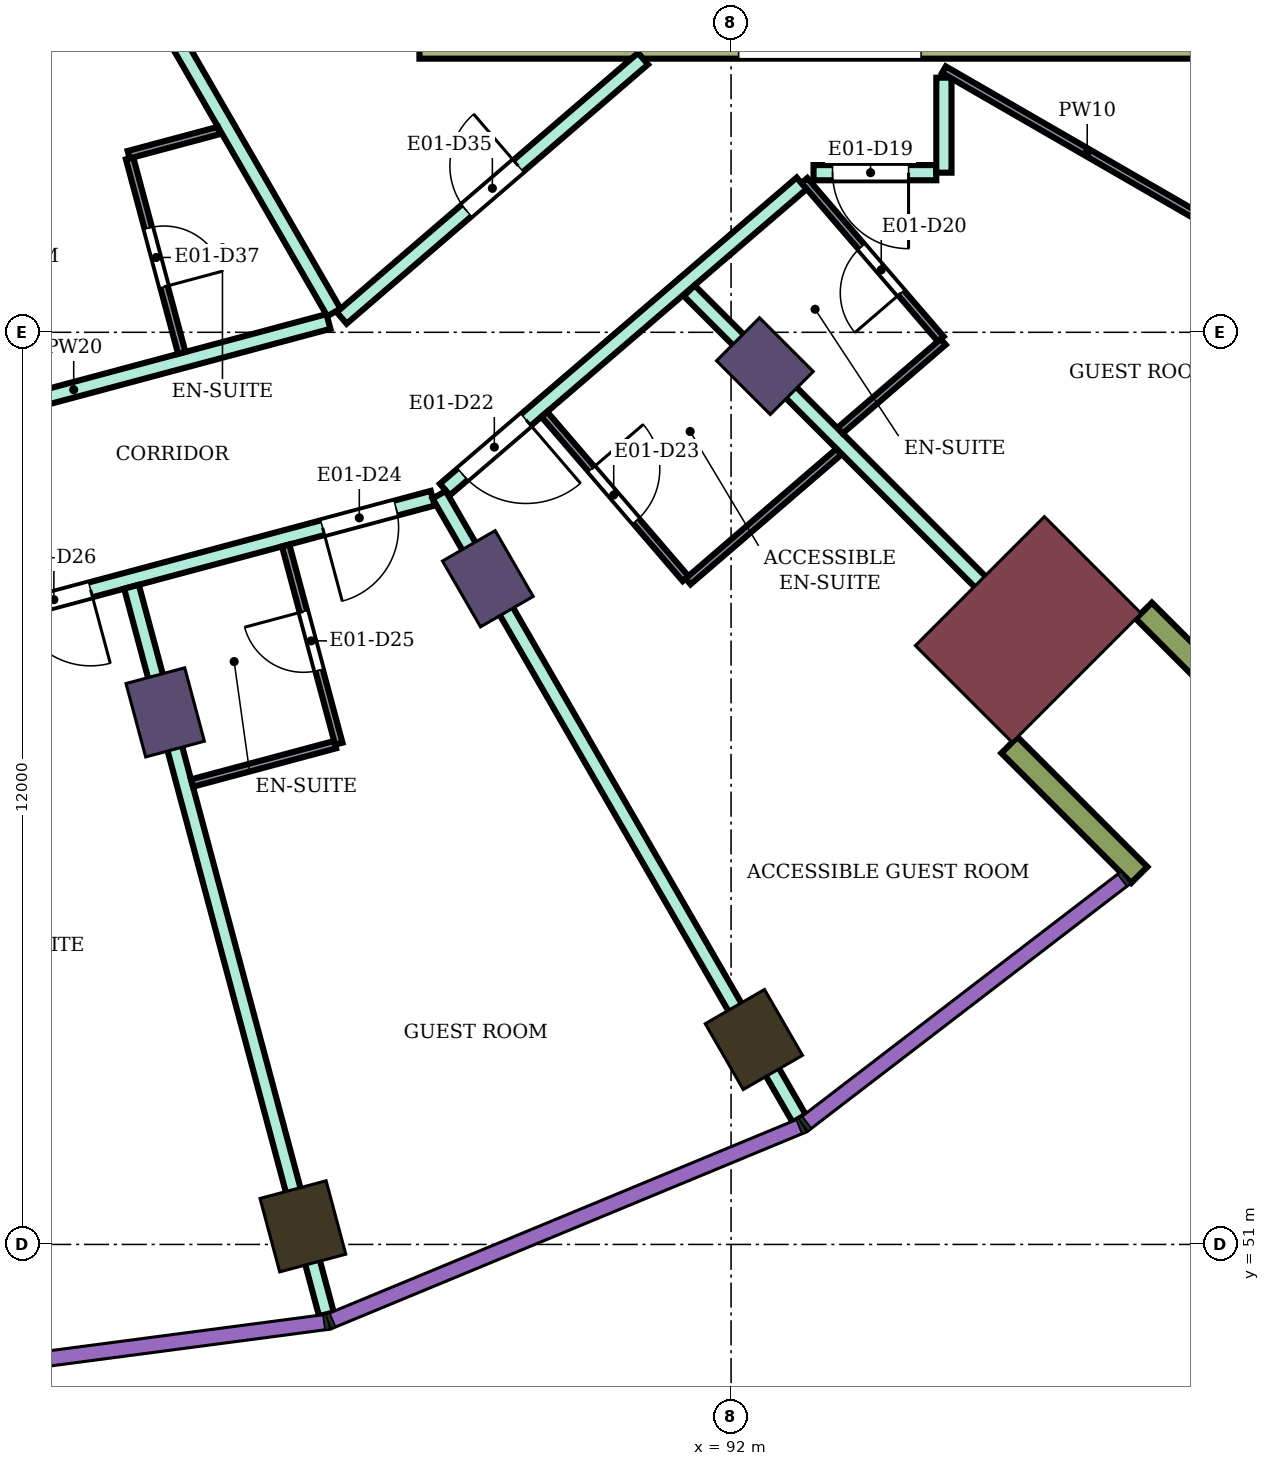
"""IFC4 building model, lengths in metres.
Left out: names, types, materials, properties, quantities, classifications, styles, units other than length and angle.
Written with IfcOpenShell. Run it as: python <this file> out.ifc"""

import sys

from ifc_helpers import new_model, si_unit, direction, frame, frame_2d, origin, origin_2d, place, context, subcontext, project, spatial, rectangle, extrude, element, fill, save


model = new_model("IFC4")
c1 = context("Model", 3, precision=1e-05, world=origin(), true_north=direction((0.0, 1.0)))
c2 = subcontext(c1, "Body", "Model", "MODEL_VIEW")
j1 = project(units=[si_unit("LENGTHUNIT", "METRE"), si_unit("PLANEANGLEUNIT", "RADIAN")], contexts=[c1])
p1 = place(None, origin())
s1 = spatial("IfcSite", under=j1, at=p1, CompositionType="ELEMENT")
p2 = place(p1, origin())
s2 = spatial("IfcBuilding", under=s1, at=p2, CompositionType="ELEMENT")
p3 = place(p2, frame((0.0, 0.0, 118.5)))
s3 = spatial("IfcBuildingStorey", under=s2, at=p3, CompositionType="ELEMENT", Elevation=118.5)
for number, where, z_axis, x_axis in (
    (1, (86.367, 51.238, 0.0), (0.0, 0.0, 1.0), (0.259, -0.966, 0.0)),
    (2, (92.3, 53.696, 0.0), (0.0, 0.0, 1.0), (0.5, -0.866, 0.0)),
):
    element("IfcColumn", number, at=place(p3, frame(where, z_axis=z_axis, x_axis=x_axis)), inside=s3, PredefinedType="COLUMN", context=c2, shape_type="SweptSolid", body=[
        extrude(rectangle(XDim=1.0, YDim=0.9, at=origin_2d()), origin(), (0.0, 0.0, 1.0), 3.9),
    ])
for number, where, z_axis, x_axis in (
    (3, (84.555, 58.0, 0.0), (0.0, 0.0, 1.0), (0.259, -0.966, 0.0)),
    (4, (88.8, 59.758, 0.0), (0.0, 0.0, 1.0), (0.5, -0.866, 0.0)),
    (5, (92.445, 62.555, 0.0), (0.0, 0.0, 1.0), (0.707, -0.707, 0.0)),
):
    element("IfcColumn", number, at=place(p3, frame(where, z_axis=z_axis, x_axis=x_axis)), inside=s3, PredefinedType="COLUMN", context=c2, shape_type="SweptSolid", body=[
        extrude(rectangle(XDim=1.0, YDim=0.8, at=origin_2d()), origin(), (0.0, 0.0, 1.0), 3.9),
    ])
p4 = place(p3, frame((95.91, 59.09, 0.0), z_axis=(0.0, 0.0, 1.0), x_axis=(0.707106781187, -0.707106781187, 0.0)))
e6 = element("IfcColumn", 6, at=p4, inside=s3, PredefinedType="COLUMN", context=c2, shape_type="SweptSolid", body=[
    extrude(rectangle(XDim=1.8, YDim=2.4, at=origin_2d()), origin(), (0.0, 0.0, 1.0), 3.9),
])
p5 = place(p3, frame((87.9, 66.95, 0.0), z_axis=(0.0, 0.0, 1.0), x_axis=(1.0, 0.0, 0.0)))
e7 = element("IfcWall", 7, at=p5, inside=s3, PredefinedType="SHEAR", context=c2, shape_type="SweptSolid", body=[
    extrude(rectangle(XDim=14.8, YDim=0.7, at=frame_2d((7.4, 0.0))), origin(), (0.0, 0.0, 1.0), 3.58),
])
p6 = place(p5, frame((4.2, 0.0, 0.0)))
e8 = element("IfcOpeningElement", 8, at=p6, cuts=e7, PredefinedType="OPENING", context=c2, shape_type="SweptSolid", body=[
    extrude(rectangle(XDim=2.4, YDim=2.4, at=frame_2d((1.2, 1.2))), frame((0.0, 0.36, 0.0), z_axis=(0.0, -1.0, 0.0), x_axis=(1.0, 0.0, 0.0)), (0.0, 0.0, 1.0), 0.72),
])
for number, where, z_axis, x_axis in (
    (9, (95.662, 57.57, 0.0), (0.0, 0.0, 1.0), (0.707, -0.707, 0.0)),
    (10, (97.43, 59.338, 0.0), (0.0, 0.0, 1.0), (0.707, -0.707, 0.0)),
):
    element("IfcWall", number, at=place(p3, frame(where, z_axis=z_axis, x_axis=x_axis)), inside=s3, PredefinedType="NOTDEFINED", context=c2, shape_type="SweptSolid", body=[
        extrude(rectangle(XDim=2.416, YDim=0.3, at=frame_2d((1.208, 0.0))), origin(), (0.0, 0.0, 1.0), 3.9),
    ])
p7 = place(p3, frame((80.0, 58.655, 0.0), z_axis=(0.0, 0.0, 1.0), x_axis=(0.965967338894, 0.258664068224, 0.0)))
e11 = element("IfcWall", 11, at=p7, inside=s3, PredefinedType="PARTITIONING", context=c2, shape_type="SweptSolid", body=[
    extrude(rectangle(XDim=8.36, YDim=0.2, at=frame_2d((4.18, 0.0))), origin(), (0.0, 0.0, 1.0), 3.45),
])
p8 = place(p7, frame((6.86, 0.0, 0.0)))
e12 = element("IfcOpeningElement", 12, at=p8, cuts=e11, PredefinedType="OPENING", context=c2, shape_type="SweptSolid", body=[
    extrude(rectangle(XDim=1.0, YDim=2.1, at=frame_2d((0.5, 1.05))), frame((0.0, 0.11, 0.0), z_axis=(0.0, -1.0, 0.0), x_axis=(1.0, 0.0, 0.0)), (0.0, 0.0, 1.0), 0.22),
])
p9 = place(p7, frame((2.7, 0.0, 0.0)))
e13 = element("IfcOpeningElement", 13, at=p9, cuts=e11, PredefinedType="OPENING", context=c2, shape_type="SweptSolid", body=[
    extrude(rectangle(XDim=1.0, YDim=2.1, at=frame_2d((0.5, 1.05))), frame((0.0, 0.11, 0.0), z_axis=(0.0, -1.0, 0.0), x_axis=(1.0, 0.0, 0.0)), (0.0, 0.0, 1.0), 0.22),
])
p10 = place(p3, frame((80.0, 61.346, 0.0), z_axis=(0.0, 0.0, 1.0), x_axis=(0.965924181808, 0.258825182312, 0.0)))
e14 = element("IfcWall", 14, at=p10, inside=s3, PredefinedType="PARTITIONING", context=c2, shape_type="SweptSolid", body=[
    extrude(rectangle(XDim=6.94, YDim=0.2, at=frame_2d((3.47, 0.0))), origin(), (0.0, 0.0, 1.0), 3.45),
])
p11 = place(p10, frame((0.55, 0.0, 0.0)))
e15 = element("IfcOpeningElement", 15, at=p11, cuts=e14, PredefinedType="OPENING", context=c2, shape_type="SweptSolid", body=[
    extrude(rectangle(XDim=1.0, YDim=2.1, at=frame_2d((0.5, 1.05))), frame((0.0, 0.11, 0.0), z_axis=(0.0, -1.0, 0.0), x_axis=(1.0, 0.0, 0.0)), (0.0, 0.0, 1.0), 0.22),
])
p12 = place(p3, frame((83.848, 68.332, 0.0), z_axis=(0.0, 0.0, 1.0), x_axis=(0.499933000352, -0.866064082594, 0.0)))
e16 = element("IfcWall", 16, at=p12, inside=s3, PredefinedType="PARTITIONING", context=c2, shape_type="SweptSolid", body=[
    extrude(rectangle(XDim=5.855, YDim=0.2, at=frame_2d((2.928, 0.0))), origin(), (0.0, 0.0, 1.0), 3.45),
])
p13 = place(p3, frame((84.112, 59.652, 0.0), z_axis=(0.0, 0.0, 1.0), x_axis=(0.258838718107, -0.965920554709, 0.0)))
e17 = element("IfcWall", 17, at=p13, inside=s3, PredefinedType="PARTITIONING", context=c2, shape_type="SweptSolid", body=[
    extrude(rectangle(XDim=9.908, YDim=0.2, at=frame_2d((4.954, 0.0))), origin(), (0.0, 0.0, 1.0), 3.45),
])
p14 = place(p3, frame((86.877, 63.189, 0.0), z_axis=(0.0, 0.0, 1.0), x_axis=(0.758075808328, 0.652166442581, 0.0)))
e18 = element("IfcWall", 18, at=p14, inside=s3, PredefinedType="PARTITIONING", context=c2, shape_type="SweptSolid", body=[
    extrude(rectangle(XDim=5.23, YDim=0.2, at=frame_2d((2.615, 0.0))), origin(), (0.0, 0.0, 1.0), 3.45),
])
p15 = place(p14, frame((2.165, 0.0, 0.0)))
e19 = element("IfcOpeningElement", 19, at=p15, cuts=e18, PredefinedType="OPENING", context=c2, shape_type="SweptSolid", body=[
    extrude(rectangle(XDim=0.9, YDim=2.1, at=frame_2d((0.45, 1.05))), frame((0.0, 0.11, 0.0), z_axis=(0.0, -1.0, 0.0), x_axis=(1.0, 0.0, 0.0)), (0.0, 0.0, 1.0), 0.22),
])
p16 = place(p3, frame((88.235, 60.931, 0.0), z_axis=(0.0, 0.0, 1.0), x_axis=(0.758816241808, 0.651304775945, 0.0)))
e20 = element("IfcWall", 20, at=p16, inside=s3, PredefinedType="PARTITIONING", context=c2, shape_type="SweptSolid", body=[
    extrude(rectangle(XDim=6.186, YDim=0.2, at=frame_2d((3.093, 0.0))), origin(), (0.0, 0.0, 1.0), 3.45),
])
p17 = place(p16, frame((0.308, 0.0, 0.0)))
e21 = element("IfcOpeningElement", 21, at=p17, cuts=e20, PredefinedType="OPENING", context=c2, shape_type="SweptSolid", body=[
    extrude(rectangle(XDim=1.1, YDim=2.1, at=frame_2d((0.55, 1.05))), frame((0.0, 0.11, 0.0), z_axis=(0.0, -1.0, 0.0), x_axis=(1.0, 0.0, 0.0)), (0.0, 0.0, 1.0), 0.22),
])
p18 = place(p3, frame((88.159, 60.863, 0.0), z_axis=(0.0, 0.0, 1.0), x_axis=(0.499935840196, -0.866062443296, 0.0)))
e22 = element("IfcWall", 22, at=p18, inside=s3, PredefinedType="PARTITIONING", context=c2, shape_type="SweptSolid", body=[
    extrude(rectangle(XDim=9.475, YDim=0.2, at=frame_2d((4.737, 0.0))), origin(), (0.0, 0.0, 1.0), 3.45),
])
p19 = place(p3, frame((91.449, 63.548, 0.0), z_axis=(0.0, 0.0, 1.0), x_axis=(0.706984804638, -0.707228736698, 0.0)))
e23 = element("IfcWall", 23, at=p19, inside=s3, PredefinedType="PARTITIONING", context=c2, shape_type="SweptSolid", body=[
    extrude(rectangle(XDim=7.006, YDim=0.2, at=frame_2d((3.503, 0.0))), origin(), (0.0, 0.0, 1.0), 3.45),
])
p20 = place(p3, frame((93.085, 65.1, 0.0), z_axis=(0.0, 0.0, 1.0), x_axis=(1.0, 0.0, 0.0)))
e24 = element("IfcWall", 24, at=p20, inside=s3, PredefinedType="PARTITIONING", context=c2, shape_type="SweptSolid", body=[
    extrude(rectangle(XDim=1.615, YDim=0.2, at=frame_2d((0.808, 0.0))), origin(), (0.0, 0.0, 1.0), 3.45),
])
p21 = place(p20, frame((0.25, 0.0, 0.0)))
e25 = element("IfcOpeningElement", 25, at=p21, cuts=e24, PredefinedType="OPENING", context=c2, shape_type="SweptSolid", body=[
    extrude(rectangle(XDim=1.0, YDim=2.1, at=frame_2d((0.5, 1.05))), frame((0.0, 0.11, 0.0), z_axis=(0.0, -1.0, 0.0), x_axis=(1.0, 0.0, 0.0)), (0.0, 0.0, 1.0), 0.22),
])
p22 = place(p3, frame((94.8, 65.1, 0.0), z_axis=(0.0, 0.0, 1.0), x_axis=(0.0, 1.0, 0.0)))
e26 = element("IfcWall", 26, at=p22, inside=s3, PredefinedType="PARTITIONING", context=c2, shape_type="SweptSolid", body=[
    extrude(rectangle(XDim=1.25, YDim=0.2, at=frame_2d((0.625, 0.0))), origin(), (0.0, 0.0, 1.0), 3.45),
])
p23 = place(p3, frame((84.087, 65.289, 0.0), z_axis=(0.0, 0.0, 1.0), x_axis=(0.258929459649, -0.965896234037, 0.0)))
e27 = element("IfcWall", 27, at=p23, inside=s3, PredefinedType="PARTITIONING", context=c2, shape_type="SweptSolid", body=[
    extrude(rectangle(XDim=2.65, YDim=0.1, at=frame_2d((1.325, 0.0))), origin(), (0.0, 0.0, 1.0), 3.45),
])
p24 = place(p23, frame((0.95, 0.0, 0.0)))
e28 = element("IfcOpeningElement", 28, at=p24, cuts=e27, PredefinedType="OPENING", context=c2, shape_type="SweptSolid", body=[
    extrude(rectangle(XDim=0.8, YDim=2.1, at=frame_2d((0.4, 1.05))), frame((0.0, 0.06, 0.0), z_axis=(0.0, -1.0, 0.0), x_axis=(1.0, 0.0, 0.0)), (0.0, 0.0, 1.0), 0.12),
])
p25 = place(p3, frame((84.074, 65.337, 0.0), z_axis=(0.0, 0.0, 1.0), x_axis=(0.965914351064, 0.258861867428, 0.0)))
e29 = element("IfcWall", 29, at=p25, inside=s3, PredefinedType="PARTITIONING", context=c2, shape_type="SweptSolid", body=[
    extrude(rectangle(XDim=1.229, YDim=0.1, at=frame_2d((0.615, 0.0))), origin(), (0.0, 0.0, 1.0), 3.45),
])
p26 = place(p3, frame((84.908, 57.07, 0.0), z_axis=(0.0, 0.0, 1.0), x_axis=(0.965853538138, 0.25908867761, 0.0)))
e30 = element("IfcWall", 30, at=p26, inside=s3, PredefinedType="PARTITIONING", context=c2, shape_type="SweptSolid", body=[
    extrude(rectangle(XDim=1.95, YDim=0.1, at=frame_2d((0.975, 0.0))), origin(), (0.0, 0.0, 1.0), 3.45),
])
p27 = place(p3, frame((86.14, 60.196, 0.0), z_axis=(0.0, 0.0, 1.0), x_axis=(0.258945475746, -0.965891940432, 0.0)))
e31 = element("IfcWall", 31, at=p27, inside=s3, PredefinedType="PARTITIONING", context=c2, shape_type="SweptSolid", body=[
    extrude(rectangle(XDim=2.7, YDim=0.1, at=frame_2d((1.35, 0.0))), origin(), (0.0, 0.0, 1.0), 3.45),
])
p28 = place(p27, frame((0.9, 0.0, 0.0)))
e32 = element("IfcOpeningElement", 32, at=p28, cuts=e31, PredefinedType="OPENING", context=c2, shape_type="SweptSolid", body=[
    extrude(rectangle(XDim=0.8, YDim=2.1, at=frame_2d((0.4, 1.05))), frame((0.0, 0.06, 0.0), z_axis=(0.0, -1.0, 0.0), x_axis=(1.0, 0.0, 0.0)), (0.0, 0.0, 1.0), 0.12),
])
p29 = place(p3, frame((89.543, 61.921, 0.0), z_axis=(0.0, 0.0, 1.0), x_axis=(0.651996917864, -0.758221616083, 0.0)))
e33 = element("IfcWall", 33, at=p29, inside=s3, PredefinedType="PARTITIONING", context=c2, shape_type="SweptSolid", body=[
    extrude(rectangle(XDim=2.85, YDim=0.1, at=frame_2d((1.425, 0.0))), origin(), (0.0, 0.0, 1.0), 3.45),
])
p30 = place(p29, frame((0.95, 0.0, 0.0)))
e34 = element("IfcOpeningElement", 34, at=p30, cuts=e33, PredefinedType="OPENING", context=c2, shape_type="SweptSolid", body=[
    extrude(rectangle(XDim=0.9, YDim=2.1, at=frame_2d((0.45, 1.05))), frame((0.0, 0.06, 0.0), z_axis=(0.0, -1.0, 0.0), x_axis=(1.0, 0.0, 0.0)), (0.0, 0.0, 1.0), 0.12),
])
p31 = place(p3, frame((91.434, 59.722, 0.0), z_axis=(0.0, 0.0, 1.0), x_axis=(0.758076316785, 0.652165851552, 0.0)))
e35 = element("IfcWall", 35, at=p31, inside=s3, PredefinedType="PARTITIONING", context=c2, shape_type="SweptSolid", body=[
    extrude(rectangle(XDim=2.616, YDim=0.1, at=frame_2d((1.308, 0.0))), origin(), (0.0, 0.0, 1.0), 3.45),
])
p32 = place(p3, frame((92.965, 64.997, 0.0), z_axis=(0.0, 0.0, 1.0), x_axis=(0.652069888227, -0.758158862553, 0.0)))
e36 = element("IfcWall", 36, at=p32, inside=s3, PredefinedType="PARTITIONING", context=c2, shape_type="SweptSolid", body=[
    extrude(rectangle(XDim=2.75, YDim=0.1, at=frame_2d((1.375, 0.0))), origin(), (0.0, 0.0, 1.0), 3.45),
])
p33 = place(p32, frame((1.15, 0.0, 0.0)))
e37 = element("IfcOpeningElement", 37, at=p33, cuts=e36, PredefinedType="OPENING", context=c2, shape_type="SweptSolid", body=[
    extrude(rectangle(XDim=0.8, YDim=2.1, at=frame_2d((0.4, 1.05))), frame((0.0, 0.06, 0.0), z_axis=(0.0, -1.0, 0.0), x_axis=(1.0, 0.0, 0.0)), (0.0, 0.0, 1.0), 0.12),
])
p34 = place(p3, frame((93.435, 61.707, 0.0), z_axis=(0.0, 0.0, 1.0), x_axis=(0.758070495124, 0.652172618578, 0.0)))
e38 = element("IfcWall", 38, at=p34, inside=s3, PredefinedType="PARTITIONING", context=c2, shape_type="SweptSolid", body=[
    extrude(rectangle(XDim=1.789, YDim=0.1, at=frame_2d((0.895, 0.0))), origin(), (0.0, 0.0, 1.0), 3.45),
])
p35 = place(p3, frame((94.8, 66.455, 0.0), z_axis=(0.0, 0.0, 1.0), x_axis=(0.86602264145, -0.500004784474, 0.0)))
e39 = element("IfcWall", 39, at=p35, inside=s3, PredefinedType="PARTITIONING", context=c2, shape_type="SweptSolid", body=[
    extrude(rectangle(XDim=8.708, YDim=0.1, at=frame_2d((4.354, 0.0))), origin(), (0.0, 0.0, 1.0), 3.45),
])
p36 = place(p35, frame((3.879, 0.0, 0.0)))
e40 = element("IfcOpeningElement", 40, at=p36, cuts=e39, PredefinedType="OPENING", context=c2, shape_type="SweptSolid", body=[
    extrude(rectangle(XDim=0.9, YDim=2.1, at=frame_2d((0.45, 1.05))), frame((0.0, 0.06, 0.0), z_axis=(0.0, -1.0, 0.0), x_axis=(1.0, 0.0, 0.0)), (0.0, 0.0, 1.0), 0.12),
])
p37 = place(p21, frame((1.0, 0.0, 0.0), z_axis=(0.0, 0.0, 1.0), x_axis=(-1.0, 0.0, 0.0)))
e41 = element("IfcDoor", 41, at=p37, inside=s3, OperationType="SINGLE_SWING_LEFT", PredefinedType="DOOR", context=c2, shape_type="SweptSolid", body=[
    extrude(rectangle(XDim=1.0, YDim=2.1, at=frame_2d((0.5, 1.05))), frame((0.0, 0.025, 0.0), z_axis=(0.0, -1.0, 0.0), x_axis=(1.0, 0.0, 0.0)), (0.0, 0.0, 1.0), 0.05),
])
fill(e25, e41)
p38 = place(p33, frame((0.8, 0.0, 0.0), z_axis=(0.0, 0.0, 1.0), x_axis=(-1.0, 0.0, 0.0)))
e42 = element("IfcDoor", 42, at=p38, inside=s3, OperationType="SINGLE_SWING_LEFT", PredefinedType="DOOR", context=c2, shape_type="SweptSolid", body=[
    extrude(rectangle(XDim=0.8, YDim=2.1, at=frame_2d((0.4, 1.05))), frame((0.0, 0.025, 0.0), z_axis=(0.0, -1.0, 0.0), x_axis=(1.0, 0.0, 0.0)), (0.0, 0.0, 1.0), 0.05),
])
fill(e37, e42)
p39 = place(p17, frame((1.1, 0.0, 0.0), z_axis=(0.0, 0.0, 1.0), x_axis=(-1.0, 0.0, 0.0)))
e43 = element("IfcDoor", 43, at=p39, inside=s3, OperationType="SINGLE_SWING_LEFT", PredefinedType="DOOR", context=c2, shape_type="SweptSolid", body=[
    extrude(rectangle(XDim=1.1, YDim=2.1, at=frame_2d((0.55, 1.05))), frame((0.0, 0.025, 0.0), z_axis=(0.0, -1.0, 0.0), x_axis=(1.0, 0.0, 0.0)), (0.0, 0.0, 1.0), 0.05),
])
fill(e21, e43)
p40 = place(p30, origin())
e44 = element("IfcDoor", 44, at=p40, inside=s3, OperationType="SINGLE_SWING_LEFT", PredefinedType="DOOR", context=c2, shape_type="SweptSolid", body=[
    extrude(rectangle(XDim=0.9, YDim=2.1, at=frame_2d((0.45, 1.05))), frame((0.0, 0.025, 0.0), z_axis=(0.0, -1.0, 0.0), x_axis=(1.0, 0.0, 0.0)), (0.0, 0.0, 1.0), 0.05),
])
fill(e34, e44)
p41 = place(p8, frame((1.0, 0.0, 0.0), z_axis=(0.0, 0.0, 1.0), x_axis=(-1.0, 0.0, 0.0)))
e45 = element("IfcDoor", 45, at=p41, inside=s3, OperationType="SINGLE_SWING_RIGHT", PredefinedType="DOOR", context=c2, shape_type="SweptSolid", body=[
    extrude(rectangle(XDim=1.0, YDim=2.1, at=frame_2d((0.5, 1.05))), frame((0.0, 0.025, 0.0), z_axis=(0.0, -1.0, 0.0), x_axis=(1.0, 0.0, 0.0)), (0.0, 0.0, 1.0), 0.05),
])
fill(e12, e45)
p42 = place(p28, frame((0.8, 0.0, 0.0), z_axis=(0.0, 0.0, 1.0), x_axis=(-1.0, 0.0, 0.0)))
e46 = element("IfcDoor", 46, at=p42, inside=s3, OperationType="SINGLE_SWING_RIGHT", PredefinedType="DOOR", context=c2, shape_type="SweptSolid", body=[
    extrude(rectangle(XDim=0.8, YDim=2.1, at=frame_2d((0.4, 1.05))), frame((0.0, 0.025, 0.0), z_axis=(0.0, -1.0, 0.0), x_axis=(1.0, 0.0, 0.0)), (0.0, 0.0, 1.0), 0.05),
])
fill(e32, e46)
p43 = place(p9, frame((1.0, 0.0, 0.0), z_axis=(0.0, 0.0, 1.0), x_axis=(-1.0, 0.0, 0.0)))
e47 = element("IfcDoor", 47, at=p43, inside=s3, OperationType="SINGLE_SWING_LEFT", PredefinedType="DOOR", context=c2, shape_type="SweptSolid", body=[
    extrude(rectangle(XDim=1.0, YDim=2.1, at=frame_2d((0.5, 1.05))), frame((0.0, 0.025, 0.0), z_axis=(0.0, -1.0, 0.0), x_axis=(1.0, 0.0, 0.0)), (0.0, 0.0, 1.0), 0.05),
])
fill(e13, e47)
p44 = place(p15, origin())
e48 = element("IfcDoor", 48, at=p44, inside=s3, OperationType="SINGLE_SWING_RIGHT", PredefinedType="DOOR", context=c2, shape_type="SweptSolid", body=[
    extrude(rectangle(XDim=0.9, YDim=2.1, at=frame_2d((0.45, 1.05))), frame((0.0, 0.025, 0.0), z_axis=(0.0, -1.0, 0.0), x_axis=(1.0, 0.0, 0.0)), (0.0, 0.0, 1.0), 0.05),
])
fill(e19, e48)
p45 = place(p24, origin())
e49 = element("IfcDoor", 49, at=p45, inside=s3, OperationType="SINGLE_SWING_RIGHT", PredefinedType="DOOR", context=c2, shape_type="SweptSolid", body=[
    extrude(rectangle(XDim=0.8, YDim=2.1, at=frame_2d((0.4, 1.05))), frame((0.0, 0.025, 0.0), z_axis=(0.0, -1.0, 0.0), x_axis=(1.0, 0.0, 0.0)), (0.0, 0.0, 1.0), 0.05),
])
fill(e28, e49)
save(model, sys.argv[1])
